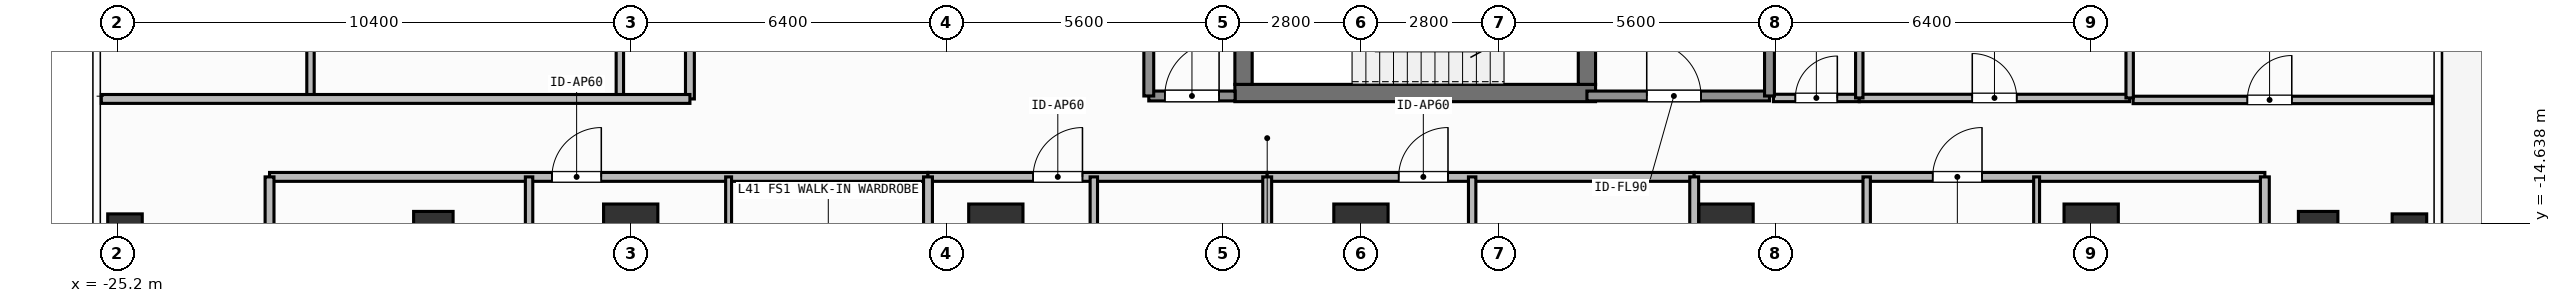
"""IFC4 building model, lengths in metres.
Left out: names, types, materials, properties, quantities, classifications, styles, units other than length and angle.
Written with IfcOpenShell. Run it as: python <this file> out.ifc"""

import sys

from ifc_helpers import new_model, si_unit, direction, frame, frame_2d, origin, origin_2d, place, context, subcontext, project, spatial, rectangle, hollow_rectangle, extrude, element, fill, save


model = new_model("IFC4")
c1 = context("Model", 3, precision=1e-05, world=origin(), true_north=direction((0.0, 1.0)))
c2 = subcontext(c1, "Body", "Model", "MODEL_VIEW")
j1 = project(units=[si_unit("LENGTHUNIT", "METRE"), si_unit("PLANEANGLEUNIT", "RADIAN")], contexts=[c1])
p1 = place(None, origin())
s1 = spatial("IfcSite", under=j1, at=p1, CompositionType="ELEMENT")
p2 = place(p1, origin())
s2 = spatial("IfcBuilding", under=s1, at=p2, CompositionType="ELEMENT")
p3 = place(p2, frame((0.0, 0.0, 168.0)))
s3 = spatial("IfcBuildingStorey", under=s2, at=p3, CompositionType="ELEMENT", Elevation=168.0)
p4 = place(p3, frame((-2.555, -12.0, 0.0), z_axis=(0.0, 0.0, 1.0), x_axis=(1.0, 0.0, 0.0)))
e1 = element("IfcWall", 1, at=p4, inside=s3, PredefinedType="SHEAR", context=c2, shape_type="SweptSolid", body=[
    extrude(rectangle(XDim=7.31, YDim=0.35, at=frame_2d((3.655, 0.0))), origin(), (0.0, 0.0, 1.0), 3.9),
])
p5 = place(p3, frame((-2.38, -11.825, 0.0), z_axis=(0.0, 0.0, 1.0), x_axis=(0.0, 1.0, 0.0)))
e2 = element("IfcWall", 2, at=p5, inside=s3, PredefinedType="SHEAR", context=c2, shape_type="SweptSolid", body=[
    extrude(rectangle(XDim=2.925, YDim=0.35, at=frame_2d((1.462, 0.0))), origin(), (0.0, 0.0, 1.0), 3.9),
])
p6 = place(p3, frame((4.58, -8.9, 0.0), z_axis=(0.0, 0.0, 1.0), x_axis=(0.0, -1.0, 0.0)))
e3 = element("IfcWall", 3, at=p6, inside=s3, PredefinedType="SHEAR", context=c2, shape_type="SweptSolid", body=[
    extrude(rectangle(XDim=2.925, YDim=0.35, at=frame_2d((1.462, 0.0))), origin(), (0.0, 0.0, 1.0), 3.9),
])
p7 = place(p6, frame((0.913, 0.0, 0.0)))
e4 = element("IfcOpeningElement", 4, at=p7, cuts=e3, PredefinedType="OPENING", context=c2, shape_type="SweptSolid", body=[
    extrude(rectangle(XDim=1.1, YDim=2.15, at=frame_2d((0.55, 1.075))), frame((0.0, 0.185, 0.0), z_axis=(0.0, -1.0, 0.0), x_axis=(1.0, 0.0, 0.0)), (0.0, 0.0, 1.0), 0.37),
])
for number, where, z_axis, x_axis in (
    (5, (-14.8, -14.8, 0.0), (0.0, 0.0, 1.0), (1.0, 0.0, 0.0)),
    (6, (-7.4, -14.8, 0.0), (0.0, 0.0, 1.0), (1.0, 0.0, 0.0)),
    (7, (0.0, -14.8, 0.0), (0.0, 0.0, 1.0), (1.0, 0.0, 0.0)),
    (8, (7.4, -14.8, 0.0), (0.0, 0.0, 1.0), (1.0, 0.0, 0.0)),
    (9, (14.8, -14.8, 0.0), (0.0, 0.0, 1.0), (1.0, 0.0, 0.0)),
):
    element("IfcColumn", number, at=place(p3, frame(where, z_axis=z_axis, x_axis=x_axis)), inside=s3, PredefinedType="COLUMN", context=c2, shape_type="SweptSolid", body=[
        extrude(rectangle(XDim=1.1, YDim=1.1, at=origin_2d()), origin(), (0.0, 0.0, 1.0), 3.9),
    ])
for number, where, z_axis, x_axis in (
    (10, (-18.8, -14.8, 0.0), (0.0, 0.0, 1.0), (1.0, 0.0, 0.0)),
    (11, (19.4, -14.8, 0.0), (0.0, 0.0, 1.0), (1.0, 0.0, 0.0)),
):
    element("IfcColumn", number, at=place(p3, frame(where, z_axis=z_axis, x_axis=x_axis)), inside=s3, PredefinedType="COLUMN", context=c2, shape_type="SweptSolid", body=[
        extrude(hollow_rectangle(XDim=0.8, YDim=0.8, WallThickness=0.036, at=origin_2d()), origin(), (0.0, 0.0, 1.0), 3.9),
    ])
for number, where, z_axis, x_axis in (
    (12, (-25.05, -14.8, 0.0), (0.0, 0.0, 1.0), (1.0, 0.0, 0.0)),
    (13, (21.25, -14.8, 0.0), (0.0, 0.0, 1.0), (1.0, 0.0, 0.0)),
):
    element("IfcColumn", number, at=place(p3, frame(where, z_axis=z_axis, x_axis=x_axis)), inside=s3, PredefinedType="COLUMN", context=c2, shape_type="SweptSolid", body=[
        extrude(hollow_rectangle(XDim=0.7, YDim=0.7, WallThickness=0.032, at=origin_2d()), origin(), (0.0, 0.0, 1.0), 3.9),
    ])
p8 = place(p3, frame((4.58, -12.06, 0.0), z_axis=(0.0, 0.0, 1.0), x_axis=(1.0, 0.0, 0.0)))
e14 = element("IfcWall", 14, at=p8, inside=s3, PredefinedType="SOLIDWALL", context=c2, shape_type="SweptSolid", body=[
    extrude(rectangle(XDim=3.7, YDim=0.2, at=frame_2d((1.85, 0.0))), origin(), (0.0, 0.0, 1.0), 3.68),
])
p9 = place(p8, frame((1.212, 0.0, 0.0)))
e15 = element("IfcOpeningElement", 15, at=p9, cuts=e14, PredefinedType="OPENING", context=c2, shape_type="SweptSolid", body=[
    extrude(rectangle(XDim=1.1, YDim=2.15, at=frame_2d((0.55, 1.075))), frame((0.0, 0.11, 0.0), z_axis=(0.0, -1.0, 0.0), x_axis=(1.0, 0.0, 0.0)), (0.0, 0.0, 1.0), 0.22),
])
p10 = place(p3, frame((-4.3, -12.06, 0.0), z_axis=(0.0, 0.0, 1.0), x_axis=(1.0, 0.0, 0.0)))
e16 = element("IfcWall", 16, at=p10, inside=s3, PredefinedType="SOLIDWALL", context=c2, shape_type="SweptSolid", body=[
    extrude(rectangle(XDim=1.75, YDim=0.2, at=frame_2d((0.875, 0.0))), origin(), (0.0, 0.0, 1.0), 3.68),
])
p11 = place(p10, frame((0.325, 0.0, 0.0)))
e17 = element("IfcOpeningElement", 17, at=p11, cuts=e16, PredefinedType="OPENING", context=c2, shape_type="SweptSolid", body=[
    extrude(rectangle(XDim=1.1, YDim=2.15, at=frame_2d((0.55, 1.075))), frame((0.0, 0.11, 0.0), z_axis=(0.0, -1.0, 0.0), x_axis=(1.0, 0.0, 0.0)), (0.0, 0.0, 1.0), 0.22),
])
p12 = place(p3, frame((8.36, -12.1, 0.0), z_axis=(0.0, 0.0, 1.0), x_axis=(1.0, 0.0, 0.0)))
e18 = element("IfcWall", 18, at=p12, inside=s3, PredefinedType="PARTITIONING", context=c2, shape_type="SweptSolid", body=[
    extrude(rectangle(XDim=1.74, YDim=0.15, at=frame_2d((0.87, 0.0))), origin(), (0.0, 0.0, 1.0), 3.68),
])
p13 = place(p12, frame((0.445, 0.0, 0.0)))
e19 = element("IfcOpeningElement", 19, at=p13, cuts=e18, PredefinedType="OPENING", context=c2, shape_type="SweptSolid", body=[
    extrude(rectangle(XDim=0.85, YDim=2.1, at=frame_2d((0.425, 1.05))), frame((0.0, 0.085, 0.0), z_axis=(0.0, -1.0, 0.0), x_axis=(1.0, 0.0, 0.0)), (0.0, 0.0, 1.0), 0.17),
])
p14 = place(p3, frame((10.1, -12.1, 0.0), z_axis=(0.0, 0.0, 1.0), x_axis=(1.0, 0.0, 0.0)))
e20 = element("IfcWall", 20, at=p14, inside=s3, PredefinedType="PARTITIONING", context=c2, shape_type="SweptSolid", body=[
    extrude(rectangle(XDim=5.48, YDim=0.15, at=frame_2d((2.74, 0.0))), origin(), (0.0, 0.0, 1.0), 3.68),
])
p15 = place(p14, frame((2.29, 0.0, 0.0)))
e21 = element("IfcOpeningElement", 21, at=p15, cuts=e20, PredefinedType="OPENING", context=c2, shape_type="SweptSolid", body=[
    extrude(rectangle(XDim=0.9, YDim=2.1, at=frame_2d((0.45, 1.05))), frame((0.0, 0.085, 0.0), z_axis=(0.0, -1.0, 0.0), x_axis=(1.0, 0.0, 0.0)), (0.0, 0.0, 1.0), 0.17),
])
p16 = place(p3, frame((-22.12, -13.7, 0.0), z_axis=(0.0, 0.0, 1.0), x_axis=(1.0, 0.0, 0.0)))
e22 = element("IfcWall", 22, at=p16, inside=s3, PredefinedType="PARTITIONING", context=c2, shape_type="SweptSolid", body=[
    extrude(rectangle(XDim=13.345, YDim=0.18, at=frame_2d((6.673, 0.0))), origin(), (0.0, 0.0, 1.0), 3.68),
])
p17 = place(p16, frame((5.724, 0.0, 0.0)))
e23 = element("IfcOpeningElement", 23, at=p17, cuts=e22, PredefinedType="OPENING", context=c2, shape_type="SweptSolid", body=[
    extrude(rectangle(XDim=1.0, YDim=2.2, at=frame_2d((0.5, 1.1))), frame((0.0, 0.1, 0.0), z_axis=(0.0, -1.0, 0.0), x_axis=(1.0, 0.0, 0.0)), (0.0, 0.0, 1.0), 0.2),
])
p18 = place(p3, frame((-16.86, -19.39, 0.0), z_axis=(0.0, 0.0, 1.0), x_axis=(0.0, 1.0, 0.0)))
e24 = element("IfcWall", 24, at=p18, inside=s3, PredefinedType="PARTITIONING", context=c2, shape_type="SweptSolid", body=[
    extrude(rectangle(XDim=5.69, YDim=0.15, at=frame_2d((2.845, 0.0))), origin(), (0.0, 0.0, 1.0), 3.68),
])
p19 = place(p18, frame((2.42, 0.0, 0.0)))
e25 = element("IfcOpeningElement", 25, at=p19, cuts=e24, PredefinedType="OPENING", context=c2, shape_type="SweptSolid", body=[
    extrude(rectangle(XDim=0.85, YDim=2.1, at=frame_2d((0.425, 1.05))), frame((0.0, 0.085, 0.0), z_axis=(0.0, -1.0, 0.0), x_axis=(1.0, 0.0, 0.0)), (0.0, 0.0, 1.0), 0.17),
])
p20 = place(p3, frame((-12.816, -17.137, 0.0), z_axis=(0.0, 0.0, 1.0), x_axis=(0.0, 1.0, 0.0)))
e26 = element("IfcWall", 26, at=p20, inside=s3, PredefinedType="PARTITIONING", context=c2, shape_type="SweptSolid", body=[
    extrude(rectangle(XDim=3.437, YDim=0.12, at=frame_2d((1.719, 0.0))), origin(), (0.0, 0.0, 1.0), 3.68),
])
p21 = place(p20, frame((0.857, 0.0, 0.0)))
e27 = element("IfcOpeningElement", 27, at=p21, cuts=e26, PredefinedType="OPENING", context=c2, shape_type="SweptSolid", body=[
    extrude(rectangle(XDim=0.85, YDim=2.1, at=frame_2d((0.425, 1.05))), frame((0.0, 0.07, 0.0), z_axis=(0.0, -1.0, 0.0), x_axis=(1.0, 0.0, 0.0)), (0.0, 0.0, 1.0), 0.14),
])
p22 = place(p3, frame((-8.775, -13.7, 0.0), z_axis=(0.0, 0.0, 1.0), x_axis=(1.0, 0.0, 0.0)))
e28 = element("IfcWall", 28, at=p22, inside=s3, PredefinedType="PARTITIONING", context=c2, shape_type="SweptSolid", body=[
    extrude(rectangle(XDim=6.875, YDim=0.18, at=frame_2d((3.438, 0.0))), origin(), (0.0, 0.0, 1.0), 3.68),
])
p23 = place(p22, frame((2.131, 0.0, 0.0)))
e29 = element("IfcOpeningElement", 29, at=p23, cuts=e28, PredefinedType="OPENING", context=c2, shape_type="SweptSolid", body=[
    extrude(rectangle(XDim=1.0, YDim=2.2, at=frame_2d((0.5, 1.1))), frame((0.0, 0.1, 0.0), z_axis=(0.0, -1.0, 0.0), x_axis=(1.0, 0.0, 0.0)), (0.0, 0.0, 1.0), 0.2),
])
p24 = place(p3, frame((-5.414, -16.829, 0.0), z_axis=(0.0, 0.0, 1.0), x_axis=(0.0, 1.0, 0.0)))
e30 = element("IfcWall", 30, at=p24, inside=s3, PredefinedType="PARTITIONING", context=c2, shape_type="SweptSolid", body=[
    extrude(rectangle(XDim=3.129, YDim=0.15, at=frame_2d((1.564, 0.0))), origin(), (0.0, 0.0, 1.0), 3.68),
])
p25 = place(p24, frame((0.516, 0.0, 0.0)))
e31 = element("IfcOpeningElement", 31, at=p25, cuts=e30, PredefinedType="OPENING", context=c2, shape_type="SweptSolid", body=[
    extrude(rectangle(XDim=0.85, YDim=2.1, at=frame_2d((0.425, 1.05))), frame((0.0, 0.085, 0.0), z_axis=(0.0, -1.0, 0.0), x_axis=(1.0, 0.0, 0.0)), (0.0, 0.0, 1.0), 0.17),
])
p26 = place(p3, frame((-1.9, -13.7, 0.0), z_axis=(0.0, 0.0, 1.0), x_axis=(1.0, 0.0, 0.0)))
e32 = element("IfcWall", 32, at=p26, inside=s3, PredefinedType="PARTITIONING", context=c2, shape_type="SweptSolid", body=[
    extrude(rectangle(XDim=8.654, YDim=0.18, at=frame_2d((4.327, 0.0))), origin(), (0.0, 0.0, 1.0), 3.68),
])
p27 = place(p26, frame((2.664, 0.0, 0.0)))
e33 = element("IfcOpeningElement", 33, at=p27, cuts=e32, PredefinedType="OPENING", context=c2, shape_type="SweptSolid", body=[
    extrude(rectangle(XDim=1.0, YDim=2.2, at=frame_2d((0.5, 1.1))), frame((0.0, 0.1, 0.0), z_axis=(0.0, -1.0, 0.0), x_axis=(1.0, 0.0, 0.0)), (0.0, 0.0, 1.0), 0.2),
])
p28 = place(p3, frame((2.254, -16.829, 0.0), z_axis=(0.0, 0.0, 1.0), x_axis=(0.0, 1.0, 0.0)))
e34 = element("IfcWall", 34, at=p28, inside=s3, PredefinedType="PARTITIONING", context=c2, shape_type="SweptSolid", body=[
    extrude(rectangle(XDim=3.129, YDim=0.15, at=frame_2d((1.564, 0.0))), origin(), (0.0, 0.0, 1.0), 3.68),
])
p29 = place(p28, frame((1.229, 0.0, 0.0)))
e35 = element("IfcOpeningElement", 35, at=p29, cuts=e34, PredefinedType="OPENING", context=c2, shape_type="SweptSolid", body=[
    extrude(rectangle(XDim=0.85, YDim=2.1, at=frame_2d((0.425, 1.05))), frame((0.0, 0.085, 0.0), z_axis=(0.0, -1.0, 0.0), x_axis=(1.0, 0.0, 0.0)), (0.0, 0.0, 1.0), 0.17),
])
p30 = place(p3, frame((6.754, -13.7, 0.0), z_axis=(0.0, 0.0, 1.0), x_axis=(1.0, 0.0, 0.0)))
e36 = element("IfcWall", 36, at=p30, inside=s3, PredefinedType="PARTITIONING", context=c2, shape_type="SweptSolid", body=[
    extrude(rectangle(XDim=11.566, YDim=0.18, at=frame_2d((5.783, 0.0))), origin(), (0.0, 0.0, 1.0), 3.68),
])
p31 = place(p30, frame((4.833, 0.0, 0.0)))
e37 = element("IfcOpeningElement", 37, at=p31, cuts=e36, PredefinedType="OPENING", context=c2, shape_type="SweptSolid", body=[
    extrude(rectangle(XDim=1.0, YDim=2.2, at=frame_2d((0.5, 1.1))), frame((0.0, 0.1, 0.0), z_axis=(0.0, -1.0, 0.0), x_axis=(1.0, 0.0, 0.0)), (0.0, 0.0, 1.0), 0.2),
])
p32 = place(p3, frame((10.25, -19.584, 0.0), z_axis=(0.0, 0.0, 1.0), x_axis=(0.0, 1.0, 0.0)))
e38 = element("IfcWall", 38, at=p32, inside=s3, PredefinedType="PARTITIONING", context=c2, shape_type="SweptSolid", body=[
    extrude(rectangle(XDim=5.884, YDim=0.15, at=frame_2d((2.942, 0.0))), origin(), (0.0, 0.0, 1.0), 3.68),
])
p33 = place(p32, frame((2.604, 0.0, 0.0)))
e39 = element("IfcOpeningElement", 39, at=p33, cuts=e38, PredefinedType="OPENING", context=c2, shape_type="SweptSolid", body=[
    extrude(rectangle(XDim=0.85, YDim=2.1, at=frame_2d((0.425, 1.05))), frame((0.0, 0.085, 0.0), z_axis=(0.0, -1.0, 0.0), x_axis=(1.0, 0.0, 0.0)), (0.0, 0.0, 1.0), 0.17),
])
p34 = place(p3, frame((13.694, -17.619, 0.0), z_axis=(0.0, 0.0, 1.0), x_axis=(0.0, 1.0, 0.0)))
e40 = element("IfcWall", 40, at=p34, inside=s3, PredefinedType="PARTITIONING", context=c2, shape_type="SweptSolid", body=[
    extrude(rectangle(XDim=3.919, YDim=0.12, at=frame_2d((1.959, 0.0))), origin(), (0.0, 0.0, 1.0), 3.68),
])
p35 = place(p34, frame((1.363, 0.0, 0.0)))
e41 = element("IfcOpeningElement", 41, at=p35, cuts=e40, PredefinedType="OPENING", context=c2, shape_type="SweptSolid", body=[
    extrude(rectangle(XDim=0.85, YDim=2.1, at=frame_2d((0.425, 1.05))), frame((0.0, 0.07, 0.0), z_axis=(0.0, -1.0, 0.0), x_axis=(1.0, 0.0, 0.0)), (0.0, 0.0, 1.0), 0.14),
])
p36 = place(p3, frame((-13.6, -12.12, 0.0), z_axis=(0.0, 0.0, 1.0), x_axis=(0.0, 1.0, 0.0)))
e42 = element("IfcWall", 42, at=p36, inside=s3, PredefinedType="PARTITIONING", context=c2, shape_type="SweptSolid", body=[
    extrude(rectangle(XDim=24.24, YDim=0.18, at=frame_2d((12.12, 0.0))), origin(), (0.0, 0.0, 1.0), 3.68),
])
p37 = place(p36, frame((11.62, 0.0, 0.0)))
e43 = element("IfcOpeningElement", 43, at=p37, cuts=e42, PredefinedType="OPENING", context=c2, shape_type="SweptSolid", body=[
    extrude(rectangle(XDim=1.0, YDim=2.2, at=frame_2d((0.5, 1.1))), frame((0.0, 0.1, 0.0), z_axis=(0.0, -1.0, 0.0), x_axis=(1.0, 0.0, 0.0)), (0.0, 0.0, 1.0), 0.2),
])
p38 = place(p3, frame((-15.02, -12.12, 0.0), z_axis=(0.0, 0.0, 1.0), x_axis=(0.0, 1.0, 0.0)))
e44 = element("IfcWall", 44, at=p38, inside=s3, PredefinedType="PARTITIONING", context=c2, shape_type="SweptSolid", body=[
    extrude(rectangle(XDim=6.684, YDim=0.15, at=frame_2d((3.342, 0.0))), origin(), (0.0, 0.0, 1.0), 3.082),
])
p39 = place(p38, frame((2.828, 0.0, 0.0)))
e45 = element("IfcOpeningElement", 45, at=p39, cuts=e44, PredefinedType="OPENING", context=c2, shape_type="SweptSolid", body=[
    extrude(rectangle(XDim=0.85, YDim=2.1, at=frame_2d((0.425, 1.05))), frame((0.0, 0.085, 0.0), z_axis=(0.0, -1.0, 0.0), x_axis=(1.0, 0.0, 0.0)), (0.0, 0.0, 1.0), 0.17),
])
p40 = place(p3, frame((15.65, -12.14, 0.0), z_axis=(0.0, 0.0, 1.0), x_axis=(1.0, 0.0, 0.0)))
e46 = element("IfcWall", 46, at=p40, inside=s3, PredefinedType="PARTITIONING", context=c2, shape_type="SweptSolid", body=[
    extrude(rectangle(XDim=6.07, YDim=0.15, at=frame_2d((3.035, 0.0))), origin(), (0.0, 0.0, 1.0), 3.68),
])
p41 = place(p40, frame((2.316, 0.0, 0.0)))
e47 = element("IfcOpeningElement", 47, at=p41, cuts=e46, PredefinedType="OPENING", context=c2, shape_type="SweptSolid", body=[
    extrude(rectangle(XDim=0.9, YDim=2.1, at=frame_2d((0.45, 1.05))), frame((0.0, 0.085, 0.0), z_axis=(0.0, -1.0, 0.0), x_axis=(1.0, 0.0, 0.0)), (0.0, 0.0, 1.0), 0.17),
])
for number, where, z_axis, x_axis in (
    (48, (8.28, -12.06, 0.0), (0.0, 0.0, 1.0), (0.0, 1.0, 0.0)),
    (49, (-4.3, -12.06, 0.0), (0.0, 0.0, 1.0), (0.0, 1.0, 0.0)),
):
    element("IfcWall", number, at=place(p3, frame(where, z_axis=z_axis, x_axis=x_axis)), inside=s3, PredefinedType="SOLIDWALL", context=c2, shape_type="SweptSolid", body=[
        extrude(rectangle(XDim=3.26, YDim=0.2, at=frame_2d((1.63, 0.0))), origin(), (0.0, 0.0, 1.0), 3.68),
    ])
p42 = place(p3, frame((10.1, -12.1, 0.0), z_axis=(0.0, 0.0, 1.0), x_axis=(0.0, 1.0, 0.0)))
e50 = element("IfcWall", 50, at=p42, inside=s3, PredefinedType="PARTITIONING", context=c2, shape_type="SweptSolid", body=[
    extrude(rectangle(XDim=2.35, YDim=0.15, at=frame_2d((1.175, 0.0))), origin(), (0.0, 0.0, 1.0), 3.68),
])
p43 = place(p3, frame((15.58, -12.1, 0.0), z_axis=(0.0, 0.0, 1.0), x_axis=(0.0, 1.0, 0.0)))
e51 = element("IfcWall", 51, at=p43, inside=s3, PredefinedType="PARTITIONING", context=c2, shape_type="SweptSolid", body=[
    extrude(rectangle(XDim=6.25, YDim=0.15, at=frame_2d((3.125, 0.0))), origin(), (0.0, 0.0, 1.0), 3.68),
])
for number, where, z_axis, x_axis in (
    (52, (-22.12, -22.51, 0.0), (0.0, 0.0, 1.0), (0.0, 1.0, 0.0)),
    (53, (18.32, -22.51, 0.0), (0.0, 0.0, 1.0), (0.0, 1.0, 0.0)),
):
    element("IfcWall", number, at=place(p3, frame(where, z_axis=z_axis, x_axis=x_axis)), inside=s3, PredefinedType="PARTITIONING", context=c2, shape_type="SweptSolid", body=[
        extrude(rectangle(XDim=8.81, YDim=0.18, at=frame_2d((4.405, 0.0))), origin(), (0.0, 0.0, 1.0), 3.68),
    ])
for number, where, z_axis, x_axis in (
    (54, (-8.775, -23.63, 0.0), (0.0, 0.0, 1.0), (0.0, 1.0, 0.0)),
    (55, (-1.9, -23.63, 0.0), (0.0, 0.0, 1.0), (0.0, 1.0, 0.0)),
    (56, (6.754, -23.63, 0.0), (0.0, 0.0, 1.0), (0.0, 1.0, 0.0)),
):
    element("IfcWall", number, at=place(p3, frame(where, z_axis=z_axis, x_axis=x_axis)), inside=s3, PredefinedType="PARTITIONING", context=c2, shape_type="SweptSolid", body=[
        extrude(rectangle(XDim=9.93, YDim=0.18, at=frame_2d((4.965, 0.0))), origin(), (0.0, 0.0, 1.0), 3.68),
    ])
p44 = place(p3, frame((-21.29, -12.12, 0.0), z_axis=(0.0, 0.0, 1.0), x_axis=(0.0, 1.0, 0.0)))
e57 = element("IfcWall", 57, at=p44, inside=s3, PredefinedType="PARTITIONING", context=c2, shape_type="SweptSolid", body=[
    extrude(rectangle(XDim=6.684, YDim=0.15, at=frame_2d((3.342, 0.0))), origin(), (0.0, 0.0, 1.0), 3.68),
])
p45 = place(p3, frame((-25.53, -12.12, 0.0), z_axis=(0.0, 0.0, 1.0), x_axis=(1.0, 0.0, 0.0)))
e58 = element("IfcWall", 58, at=p45, inside=s3, PredefinedType="PARTITIONING", context=c2, shape_type="SweptSolid", body=[
    extrude(rectangle(XDim=11.93, YDim=0.18, at=frame_2d((5.965, 0.0))), origin(), (0.0, 0.0, 1.0), 3.68),
])
p46 = place(p9, origin())
e59 = element("IfcDoor", 59, at=p46, inside=s3, OperationType="SINGLE_SWING_LEFT", PredefinedType="DOOR", context=c2, shape_type="SweptSolid", body=[
    extrude(rectangle(XDim=1.1, YDim=2.15, at=frame_2d((0.55, 1.075))), frame((0.0, 0.025, 0.0), z_axis=(0.0, -1.0, 0.0), x_axis=(1.0, 0.0, 0.0)), (0.0, 0.0, 1.0), 0.05),
])
fill(e15, e59)
p47 = place(p11, origin())
e60 = element("IfcDoor", 60, at=p47, inside=s3, OperationType="SINGLE_SWING_RIGHT", PredefinedType="DOOR", context=c2, shape_type="SweptSolid", body=[
    extrude(rectangle(XDim=1.1, YDim=2.15, at=frame_2d((0.55, 1.075))), frame((0.0, 0.025, 0.0), z_axis=(0.0, -1.0, 0.0), x_axis=(1.0, 0.0, 0.0)), (0.0, 0.0, 1.0), 0.05),
])
fill(e17, e60)
p48 = place(p13, origin())
e61 = element("IfcDoor", 61, at=p48, inside=s3, OperationType="SINGLE_SWING_RIGHT", PredefinedType="DOOR", context=c2, shape_type="SweptSolid", body=[
    extrude(rectangle(XDim=0.85, YDim=2.1, at=frame_2d((0.425, 1.05))), frame((0.0, 0.025, 0.0), z_axis=(0.0, -1.0, 0.0), x_axis=(1.0, 0.0, 0.0)), (0.0, 0.0, 1.0), 0.05),
])
fill(e19, e61)
p49 = place(p15, origin())
e62 = element("IfcDoor", 62, at=p49, inside=s3, OperationType="SINGLE_SWING_LEFT", PredefinedType="DOOR", context=c2, shape_type="SweptSolid", body=[
    extrude(rectangle(XDim=0.9, YDim=2.1, at=frame_2d((0.45, 1.05))), frame((0.0, 0.025, 0.0), z_axis=(0.0, -1.0, 0.0), x_axis=(1.0, 0.0, 0.0)), (0.0, 0.0, 1.0), 0.05),
])
fill(e21, e62)
p50 = place(p17, origin())
e63 = element("IfcDoor", 63, at=p50, inside=s3, OperationType="SINGLE_SWING_RIGHT", PredefinedType="DOOR", context=c2, shape_type="SweptSolid", body=[
    extrude(rectangle(XDim=1.0, YDim=2.2, at=frame_2d((0.5, 1.1))), frame((0.0, 0.025, 0.0), z_axis=(0.0, -1.0, 0.0), x_axis=(1.0, 0.0, 0.0)), (0.0, 0.0, 1.0), 0.05),
])
fill(e23, e63)
p51 = place(p23, origin())
e64 = element("IfcDoor", 64, at=p51, inside=s3, OperationType="SINGLE_SWING_RIGHT", PredefinedType="DOOR", context=c2, shape_type="SweptSolid", body=[
    extrude(rectangle(XDim=1.0, YDim=2.2, at=frame_2d((0.5, 1.1))), frame((0.0, 0.025, 0.0), z_axis=(0.0, -1.0, 0.0), x_axis=(1.0, 0.0, 0.0)), (0.0, 0.0, 1.0), 0.05),
])
fill(e29, e64)
p52 = place(p27, origin())
e65 = element("IfcDoor", 65, at=p52, inside=s3, OperationType="SINGLE_SWING_RIGHT", PredefinedType="DOOR", context=c2, shape_type="SweptSolid", body=[
    extrude(rectangle(XDim=1.0, YDim=2.2, at=frame_2d((0.5, 1.1))), frame((0.0, 0.025, 0.0), z_axis=(0.0, -1.0, 0.0), x_axis=(1.0, 0.0, 0.0)), (0.0, 0.0, 1.0), 0.05),
])
fill(e33, e65)
p53 = place(p31, origin())
e66 = element("IfcDoor", 66, at=p53, inside=s3, OperationType="SINGLE_SWING_RIGHT", PredefinedType="DOOR", context=c2, shape_type="SweptSolid", body=[
    extrude(rectangle(XDim=1.0, YDim=2.2, at=frame_2d((0.5, 1.1))), frame((0.0, 0.025, 0.0), z_axis=(0.0, -1.0, 0.0), x_axis=(1.0, 0.0, 0.0)), (0.0, 0.0, 1.0), 0.05),
])
fill(e37, e66)
p54 = place(p41, origin())
e67 = element("IfcDoor", 67, at=p54, inside=s3, OperationType="SINGLE_SWING_RIGHT", PredefinedType="DOOR", context=c2, shape_type="SweptSolid", body=[
    extrude(rectangle(XDim=0.9, YDim=2.1, at=frame_2d((0.45, 1.05))), frame((0.0, 0.025, 0.0), z_axis=(0.0, -1.0, 0.0), x_axis=(1.0, 0.0, 0.0)), (0.0, 0.0, 1.0), 0.05),
])
fill(e47, e67)
save(model, sys.argv[1])
